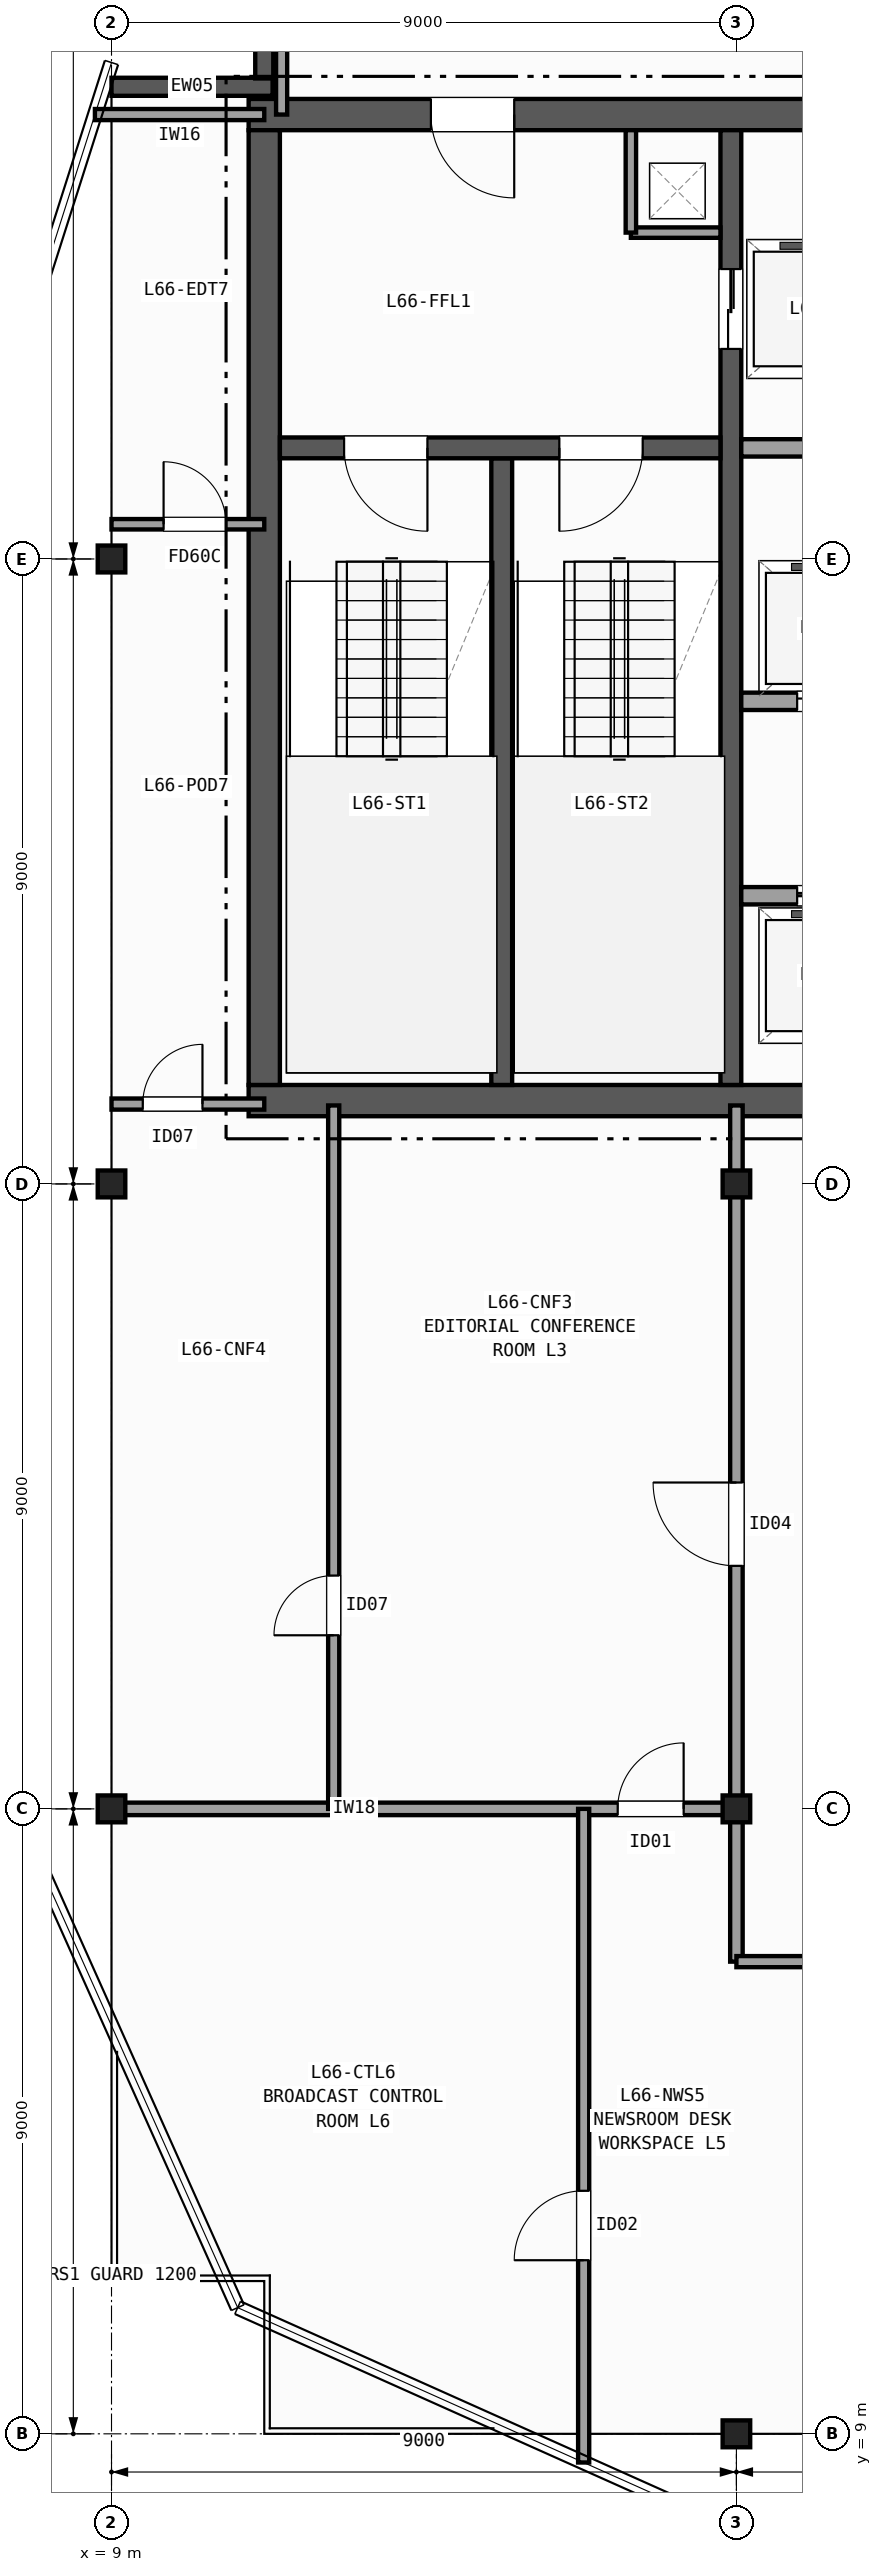
"""IFC4 building model, lengths in metres.
Left out: names, types, materials, properties, quantities, classifications, styles, units other than length and angle.
Written with IfcOpenShell. Run it as: python <this file> out.ifc"""

import sys

from ifc_helpers import new_model, si_unit, direction, frame, frame_2d, origin, origin_2d, place, context, subcontext, project, spatial, rectangle, i_section, extrude, element, fill, save


model = new_model("IFC4")
c1 = context("Model", 3, precision=1e-05, world=origin(), true_north=direction((0.0, 1.0)))
c2 = subcontext(c1, "Body", "Model", "MODEL_VIEW")
j1 = project(units=[si_unit("LENGTHUNIT", "METRE"), si_unit("PLANEANGLEUNIT", "RADIAN")], contexts=[c1])
p1 = place(None, origin())
s1 = spatial("IfcSite", under=j1, at=p1, CompositionType="ELEMENT")
p2 = place(p1, origin())
s2 = spatial("IfcBuilding", under=s1, at=p2, CompositionType="ELEMENT")
p3 = place(p2, frame((0.0, 0.0, 263.0)))
s3 = spatial("IfcBuildingStorey", under=s2, at=p3, CompositionType="ELEMENT", Elevation=263.0)
for number, where, z_axis, x_axis in (
    (1, (9.0, 18.0, 0.0), (0.0, 0.0, 1.0), (1.0, 0.0, 0.0)),
    (2, (9.0, 27.0, 0.0), (0.0, 0.0, 1.0), (1.0, 0.0, 0.0)),
    (3, (9.0, 36.0, 0.0), (0.0, 0.0, 1.0), (1.0, 0.0, 0.0)),
    (4, (18.0, 9.0, 0.0), (0.0, 0.0, 1.0), (1.0, 0.0, 0.0)),
    (5, (18.0, 18.0, 0.0), (0.0, 0.0, 1.0), (1.0, 0.0, 0.0)),
    (6, (18.0, 27.0, 0.0), (0.0, 0.0, 1.0), (1.0, 0.0, 0.0)),
):
    element("IfcColumn", number, at=place(p3, frame(where, z_axis=z_axis, x_axis=x_axis)), inside=s3, PredefinedType="COLUMN", context=c2, shape_type="SweptSolid", body=[
        extrude(i_section(OverallWidth=0.397, OverallDepth=0.387, WebThickness=0.021, FlangeThickness=0.033, FilletRadius=0.015, at=origin_2d()), origin(), (0.0, 0.0, 1.0), 3.7),
    ])
p4 = place(p3, frame((9.0, 42.8, 0.0), z_axis=(0.0, 0.0, 1.0), x_axis=(1.0, 0.0, 0.0)))
e7 = element("IfcWall", 7, at=p4, inside=s3, PredefinedType="SOLIDWALL", context=c2, shape_type="SweptSolid", body=[
    extrude(rectangle(XDim=2.32, YDim=0.26, at=frame_2d((1.16, 0.0))), origin(), (0.0, 0.0, 1.0), 3.42),
])
p5 = place(p3, frame((11.2, 42.92, 0.0), z_axis=(0.0, 0.0, 1.0), x_axis=(0.0, 1.0, 0.0)))
e8 = element("IfcWall", 8, at=p5, inside=s3, PredefinedType="SOLIDWALL", context=c2, shape_type="SweptSolid", body=[
    extrude(rectangle(XDim=2.08, YDim=0.26, at=frame_2d((1.04, 0.0))), origin(), (0.0, 0.0, 1.0), 3.42),
])
p6 = place(p3, frame((10.975, 28.2, 0.0), z_axis=(0.0, 0.0, 1.0), x_axis=(1.0, 0.0, 0.0)))
e9 = element("IfcWall", 9, at=p6, inside=s3, PredefinedType="SHEAR", context=c2, shape_type="SweptSolid", body=[
    extrude(rectangle(XDim=13.85, YDim=0.45, at=frame_2d((6.925, 0.0))), origin(), (0.0, 0.0, 1.0), 3.42),
])
p7 = place(p3, frame((24.825, 42.4, 0.0), z_axis=(0.0, 0.0, 1.0), x_axis=(-1.0, 0.0, 0.0)))
e10 = element("IfcWall", 10, at=p7, inside=s3, PredefinedType="SHEAR", context=c2, shape_type="SweptSolid", body=[
    extrude(rectangle(XDim=13.85, YDim=0.45, at=frame_2d((6.925, 0.0))), origin(), (0.0, 0.0, 1.0), 3.42),
])
p8 = place(p7, frame((10.025, 0.0, 0.0)))
e11 = element("IfcOpeningElement", 11, at=p8, cuts=e10, PredefinedType="OPENING", context=c2, shape_type="SweptSolid", body=[
    extrude(rectangle(XDim=1.2, YDim=2.15, at=frame_2d((0.6, 1.075))), frame((0.0, 0.235, 0.0), z_axis=(0.0, -1.0, 0.0), x_axis=(1.0, 0.0, 0.0)), (0.0, 0.0, 1.0), 0.47),
])
p9 = place(p7, frame((2.975, 0.0, 0.0)))
e12 = element("IfcOpeningElement", 12, at=p9, cuts=e10, PredefinedType="OPENING", context=c2, shape_type="SweptSolid", body=[
    extrude(rectangle(XDim=0.9, YDim=2.1, at=frame_2d((0.45, 1.05))), frame((0.0, 0.235, 0.0), z_axis=(0.0, -1.0, 0.0), x_axis=(1.0, 0.0, 0.0)), (0.0, 0.0, 1.0), 0.47),
])
p10 = place(p3, frame((11.2, 42.175, 0.0), z_axis=(0.0, 0.0, 1.0), x_axis=(0.0, -1.0, 0.0)))
e13 = element("IfcWall", 13, at=p10, inside=s3, PredefinedType="SHEAR", context=c2, shape_type="SweptSolid", body=[
    extrude(rectangle(XDim=13.75, YDim=0.45, at=frame_2d((6.875, 0.0))), origin(), (0.0, 0.0, 1.0), 3.42),
])
p11 = place(p3, frame((14.62, 28.425, 0.0), z_axis=(0.0, 0.0, 1.0), x_axis=(0.0, 1.0, 0.0)))
e14 = element("IfcWall", 14, at=p11, inside=s3, PredefinedType="SHEAR", context=c2, shape_type="SweptSolid", body=[
    extrude(rectangle(XDim=9.025, YDim=0.3, at=frame_2d((4.512, 0.0))), origin(), (0.0, 0.0, 1.0), 3.42),
])
p12 = place(p3, frame((17.92, 42.175, 0.0), z_axis=(0.0, 0.0, 1.0), x_axis=(0.0, -1.0, 0.0)))
e15 = element("IfcWall", 15, at=p12, inside=s3, PredefinedType="SHEAR", context=c2, shape_type="SweptSolid", body=[
    extrude(rectangle(XDim=13.75, YDim=0.3, at=frame_2d((6.875, 0.0))), origin(), (0.0, 0.0, 1.0), 3.42),
])
p13 = place(p12, frame((2.0, 0.0, 0.0)))
e16 = element("IfcOpeningElement", 16, at=p13, cuts=e15, PredefinedType="OPENING", context=c2, shape_type="SweptSolid", body=[
    extrude(rectangle(XDim=1.15, YDim=2.15, at=frame_2d((0.575, 1.075))), frame((0.0, 0.16, 0.0), z_axis=(0.0, -1.0, 0.0), x_axis=(1.0, 0.0, 0.0)), (0.0, 0.0, 1.0), 0.32),
])
p14 = place(p3, frame((17.77, 37.6, 0.0), z_axis=(0.0, 0.0, 1.0), x_axis=(-1.0, 0.0, 0.0)))
e17 = element("IfcWall", 17, at=p14, inside=s3, PredefinedType="SHEAR", context=c2, shape_type="SweptSolid", body=[
    extrude(rectangle(XDim=6.345, YDim=0.3, at=frame_2d((3.172, 0.0))), origin(), (0.0, 0.0, 1.0), 3.42),
])
p15 = place(p14, frame((4.22, 0.0, 0.0)))
e18 = element("IfcOpeningElement", 18, at=p15, cuts=e17, PredefinedType="OPENING", context=c2, shape_type="SweptSolid", body=[
    extrude(rectangle(XDim=1.2, YDim=2.15, at=frame_2d((0.6, 1.075))), frame((0.0, 0.16, 0.0), z_axis=(0.0, -1.0, 0.0), x_axis=(1.0, 0.0, 0.0)), (0.0, 0.0, 1.0), 0.32),
])
p16 = place(p14, frame((1.12, 0.0, 0.0)))
e19 = element("IfcOpeningElement", 19, at=p16, cuts=e17, PredefinedType="OPENING", context=c2, shape_type="SweptSolid", body=[
    extrude(rectangle(XDim=1.2, YDim=2.15, at=frame_2d((0.6, 1.075))), frame((0.0, 0.16, 0.0), z_axis=(0.0, -1.0, 0.0), x_axis=(1.0, 0.0, 0.0)), (0.0, 0.0, 1.0), 0.32),
])
p17 = place(p3, frame((16.48, 40.7, 0.0), z_axis=(0.0, 0.0, 1.0), x_axis=(1.0, 0.0, 0.0)))
e20 = element("IfcWall", 20, at=p17, inside=s3, PredefinedType="PARTITIONING", context=c2, shape_type="SweptSolid", body=[
    extrude(rectangle(XDim=1.29, YDim=0.15, at=frame_2d((0.645, 0.0))), origin(), (0.0, 0.0, 1.0), 3.42),
])
p18 = place(p3, frame((16.48, 40.7, 0.0), z_axis=(0.0, 0.0, 1.0), x_axis=(0.0, 1.0, 0.0)))
e21 = element("IfcWall", 21, at=p18, inside=s3, PredefinedType="PARTITIONING", context=c2, shape_type="SweptSolid", body=[
    extrude(rectangle(XDim=1.475, YDim=0.15, at=frame_2d((0.738, 0.0))), origin(), (0.0, 0.0, 1.0), 3.42),
])
p19 = place(p3, frame((18.07, 37.6, 0.0), z_axis=(0.0, 0.0, 1.0), x_axis=(1.0, 0.0, 0.0)))
e22 = element("IfcWall", 22, at=p19, inside=s3, PredefinedType="PARTITIONING", context=c2, shape_type="SweptSolid", body=[
    extrude(rectangle(XDim=6.305, YDim=0.25, at=frame_2d((3.152, 0.0))), origin(), (0.0, 0.0, 1.0), 3.42),
])
p20 = place(p3, frame((18.07, 31.15, 0.0), z_axis=(0.0, 0.0, 1.0), x_axis=(1.0, 0.0, 0.0)))
e23 = element("IfcWall", 23, at=p20, inside=s3, PredefinedType="PARTITIONING", context=c2, shape_type="SweptSolid", body=[
    extrude(rectangle(XDim=6.305, YDim=0.25, at=frame_2d((3.152, 0.0))), origin(), (0.0, 0.0, 1.0), 3.42),
])
p21 = place(p20, frame((0.805, 0.0, 0.0)))
e24 = element("IfcOpeningElement", 24, at=p21, cuts=e23, PredefinedType="OPENING", context=c2, shape_type="SweptSolid", body=[
    extrude(rectangle(XDim=1.15, YDim=2.15, at=frame_2d((0.575, 1.075))), frame((0.0, 0.135, 0.0), z_axis=(0.0, -1.0, 0.0), x_axis=(1.0, 0.0, 0.0)), (0.0, 0.0, 1.0), 0.27),
])
p22 = place(p20, frame((3.355, 0.0, 0.0)))
e25 = element("IfcOpeningElement", 25, at=p22, cuts=e23, PredefinedType="OPENING", context=c2, shape_type="SweptSolid", body=[
    extrude(rectangle(XDim=1.15, YDim=2.15, at=frame_2d((0.575, 1.075))), frame((0.0, 0.135, 0.0), z_axis=(0.0, -1.0, 0.0), x_axis=(1.0, 0.0, 0.0)), (0.0, 0.0, 1.0), 0.27),
])
p23 = place(p3, frame((24.375, 33.95, 0.0), z_axis=(0.0, 0.0, 1.0), x_axis=(-1.0, 0.0, 0.0)))
e26 = element("IfcWall", 26, at=p23, inside=s3, PredefinedType="PARTITIONING", context=c2, shape_type="SweptSolid", body=[
    extrude(rectangle(XDim=6.305, YDim=0.25, at=frame_2d((3.152, 0.0))), origin(), (0.0, 0.0, 1.0), 3.42),
])
p24 = place(p23, frame((4.35, 0.0, 0.0)))
e27 = element("IfcOpeningElement", 27, at=p24, cuts=e26, PredefinedType="OPENING", context=c2, shape_type="SweptSolid", body=[
    extrude(rectangle(XDim=1.15, YDim=2.15, at=frame_2d((0.575, 1.075))), frame((0.0, 0.135, 0.0), z_axis=(0.0, -1.0, 0.0), x_axis=(1.0, 0.0, 0.0)), (0.0, 0.0, 1.0), 0.27),
])
p25 = place(p23, frame((1.8, 0.0, 0.0)))
e28 = element("IfcOpeningElement", 28, at=p25, cuts=e26, PredefinedType="OPENING", context=c2, shape_type="SweptSolid", body=[
    extrude(rectangle(XDim=1.15, YDim=2.15, at=frame_2d((0.575, 1.075))), frame((0.0, 0.135, 0.0), z_axis=(0.0, -1.0, 0.0), x_axis=(1.0, 0.0, 0.0)), (0.0, 0.0, 1.0), 0.27),
])
p26 = place(p3, frame((9.0, 28.15, 0.0), z_axis=(0.0, 0.0, 1.0), x_axis=(1.0, 0.0, 0.0)))
e29 = element("IfcWall", 29, at=p26, inside=s3, PredefinedType="PARTITIONING", context=c2, shape_type="SweptSolid", body=[
    extrude(rectangle(XDim=2.2, YDim=0.16, at=frame_2d((1.1, 0.0))), origin(), (0.0, 0.0, 1.0), 2.707),
])
p27 = place(p26, frame((0.45, 0.0, 0.0)))
e30 = element("IfcOpeningElement", 30, at=p27, cuts=e29, PredefinedType="OPENING", context=c2, shape_type="SweptSolid", body=[
    extrude(rectangle(XDim=0.86, YDim=2.05, at=frame_2d((0.43, 1.025))), frame((0.0, 0.09, 0.0), z_axis=(0.0, -1.0, 0.0), x_axis=(1.0, 0.0, 0.0)), (0.0, 0.0, 1.0), 0.18),
])
p28 = place(p3, frame((8.761, 42.4, 0.0), z_axis=(0.0, 0.0, 1.0), x_axis=(1.0, 0.0, 0.0)))
e31 = element("IfcWall", 31, at=p28, inside=s3, PredefinedType="PARTITIONING", context=c2, shape_type="SweptSolid", body=[
    extrude(rectangle(XDim=2.439, YDim=0.16, at=frame_2d((1.219, 0.0))), origin(), (0.0, 0.0, 1.0), 3.42),
])
p29 = place(p3, frame((11.45, 42.4, 0.0), z_axis=(0.0, 0.0, 1.0), x_axis=(0.0, 1.0, 0.0)))
e32 = element("IfcWall", 32, at=p29, inside=s3, PredefinedType="PARTITIONING", context=c2, shape_type="SweptSolid", body=[
    extrude(rectangle(XDim=2.666, YDim=0.16, at=frame_2d((1.333, 0.0))), origin(), (0.0, 0.0, 1.0), 3.42),
])
p30 = place(p3, frame((9.0, 36.5, 0.0), z_axis=(0.0, 0.0, 1.0), x_axis=(1.0, 0.0, 0.0)))
e33 = element("IfcWall", 33, at=p30, inside=s3, PredefinedType="PARTITIONING", context=c2, shape_type="SweptSolid", body=[
    extrude(rectangle(XDim=2.2, YDim=0.15, at=frame_2d((1.1, 0.0))), origin(), (0.0, 0.0, 1.0), 3.42),
])
p31 = place(p30, frame((0.75, 0.0, 0.0)))
e34 = element("IfcOpeningElement", 34, at=p31, cuts=e33, PredefinedType="OPENING", context=c2, shape_type="SweptSolid", body=[
    extrude(rectangle(XDim=0.9, YDim=2.1, at=frame_2d((0.45, 1.05))), frame((0.0, 0.085, 0.0), z_axis=(0.0, -1.0, 0.0), x_axis=(1.0, 0.0, 0.0)), (0.0, 0.0, 1.0), 0.17),
])
p32 = place(p3, frame((9.0, 18.0, 0.0), z_axis=(0.0, 0.0, 1.0), x_axis=(1.0, 0.0, 0.0)))
e35 = element("IfcWall", 35, at=p32, inside=s3, PredefinedType="PARTITIONING", context=c2, shape_type="SweptSolid", body=[
    extrude(rectangle(XDim=9.08, YDim=0.18, at=frame_2d((4.54, 0.0))), origin(), (0.0, 0.0, 1.0), 2.707),
])
p33 = place(p32, frame((7.29, 0.0, 0.0)))
e36 = element("IfcOpeningElement", 36, at=p33, cuts=e35, PredefinedType="OPENING", context=c2, shape_type="SweptSolid", body=[
    extrude(rectangle(XDim=0.95, YDim=2.1, at=frame_2d((0.475, 1.05))), frame((0.0, 0.1, 0.0), z_axis=(0.0, -1.0, 0.0), x_axis=(1.0, 0.0, 0.0)), (0.0, 0.0, 1.0), 0.2),
])
p34 = place(p3, frame((18.0, 15.8, 0.0), z_axis=(0.0, 0.0, 1.0), x_axis=(0.0, 1.0, 0.0)))
e37 = element("IfcWall", 37, at=p34, inside=s3, PredefinedType="PARTITIONING", context=c2, shape_type="SweptSolid", body=[
    extrude(rectangle(XDim=12.33, YDim=0.18, at=frame_2d((6.165, 0.0))), origin(), (0.0, 0.0, 1.0), 2.789),
])
p35 = place(p34, frame((5.7, 0.0, 0.0)))
e38 = element("IfcOpeningElement", 38, at=p35, cuts=e37, PredefinedType="OPENING", context=c2, shape_type="SweptSolid", body=[
    extrude(rectangle(XDim=1.2, YDim=2.15, at=frame_2d((0.6, 1.075))), frame((0.0, 0.1, 0.0), z_axis=(0.0, -1.0, 0.0), x_axis=(1.0, 0.0, 0.0)), (0.0, 0.0, 1.0), 0.2),
])
p36 = place(p3, frame((18.0, 15.8, 0.0), z_axis=(0.0, 0.0, 1.0), x_axis=(1.0, 0.0, 0.0)))
e39 = element("IfcWall", 39, at=p36, inside=s3, PredefinedType="PARTITIONING", context=c2, shape_type="SweptSolid", body=[
    extrude(rectangle(XDim=6.65, YDim=0.16, at=frame_2d((3.325, 0.0))), origin(), (0.0, 0.0, 1.0), 2.789),
])
p37 = place(p3, frame((12.2, 18.0, 0.0), z_axis=(0.0, 0.0, 1.0), x_axis=(0.0, 1.0, 0.0)))
e40 = element("IfcWall", 40, at=p37, inside=s3, PredefinedType="PARTITIONING", context=c2, shape_type="SweptSolid", body=[
    extrude(rectangle(XDim=10.13, YDim=0.16, at=frame_2d((5.065, 0.0))), origin(), (0.0, 0.0, 1.0), 2.789),
])
p38 = place(p37, frame((2.5, 0.0, 0.0)))
e41 = element("IfcOpeningElement", 41, at=p38, cuts=e40, PredefinedType="OPENING", context=c2, shape_type="SweptSolid", body=[
    extrude(rectangle(XDim=0.86, YDim=2.05, at=frame_2d((0.43, 1.025))), frame((0.0, 0.09, 0.0), z_axis=(0.0, -1.0, 0.0), x_axis=(1.0, 0.0, 0.0)), (0.0, 0.0, 1.0), 0.18),
])
p39 = place(p3, frame((15.8, 8.587, 0.0), z_axis=(0.0, 0.0, 1.0), x_axis=(0.0, 1.0, 0.0)))
e42 = element("IfcWall", 42, at=p39, inside=s3, PredefinedType="PARTITIONING", context=c2, shape_type="SweptSolid", body=[
    extrude(rectangle(XDim=9.413, YDim=0.16, at=frame_2d((4.707, 0.0))), origin(), (0.0, 0.0, 1.0), 2.789),
])
p40 = place(p39, frame((2.913, 0.0, 0.0)))
e43 = element("IfcOpeningElement", 43, at=p40, cuts=e42, PredefinedType="OPENING", context=c2, shape_type="SweptSolid", body=[
    extrude(rectangle(XDim=1.0, YDim=2.1, at=frame_2d((0.5, 1.05))), frame((0.0, 0.09, 0.0), z_axis=(0.0, -1.0, 0.0), x_axis=(1.0, 0.0, 0.0)), (0.0, 0.0, 1.0), 0.18),
])
p41 = place(p15, origin())
e44 = element("IfcDoor", 44, at=p41, inside=s3, OperationType="SINGLE_SWING_LEFT", PredefinedType="DOOR", context=c2, shape_type="SweptSolid", body=[
    extrude(rectangle(XDim=1.2, YDim=2.15, at=frame_2d((0.6, 1.075))), frame((0.0, 0.025, 0.0), z_axis=(0.0, -1.0, 0.0), x_axis=(1.0, 0.0, 0.0)), (0.0, 0.0, 1.0), 0.05),
])
fill(e18, e44)
p42 = place(p16, origin())
e45 = element("IfcDoor", 45, at=p42, inside=s3, OperationType="SINGLE_SWING_RIGHT", PredefinedType="DOOR", context=c2, shape_type="SweptSolid", body=[
    extrude(rectangle(XDim=1.2, YDim=2.15, at=frame_2d((0.6, 1.075))), frame((0.0, 0.025, 0.0), z_axis=(0.0, -1.0, 0.0), x_axis=(1.0, 0.0, 0.0)), (0.0, 0.0, 1.0), 0.05),
])
fill(e19, e45)
p43 = place(p8, origin())
e46 = element("IfcDoor", 46, at=p43, inside=s3, OperationType="SINGLE_SWING_LEFT", PredefinedType="DOOR", context=c2, shape_type="SweptSolid", body=[
    extrude(rectangle(XDim=1.2, YDim=2.15, at=frame_2d((0.6, 1.075))), frame((0.0, 0.025, 0.0), z_axis=(0.0, -1.0, 0.0), x_axis=(1.0, 0.0, 0.0)), (0.0, 0.0, 1.0), 0.05),
])
fill(e11, e46)
p44 = place(p13, origin())
e47 = element("IfcDoor", 47, at=p44, inside=s3, OperationType="DOUBLE_DOOR_SLIDING", PredefinedType="DOOR", context=c2, shape_type="SweptSolid", body=[
    extrude(rectangle(XDim=1.15, YDim=2.15, at=frame_2d((0.575, 1.075))), frame((0.0, 0.025, 0.0), z_axis=(0.0, -1.0, 0.0), x_axis=(1.0, 0.0, 0.0)), (0.0, 0.0, 1.0), 0.05),
])
fill(e16, e47)
p45 = place(p21, origin())
e48 = element("IfcDoor", 48, at=p45, inside=s3, OperationType="DOUBLE_DOOR_SLIDING", PredefinedType="DOOR", context=c2, shape_type="SweptSolid", body=[
    extrude(rectangle(XDim=1.15, YDim=2.15, at=frame_2d((0.575, 1.075))), frame((0.0, 0.025, 0.0), z_axis=(0.0, -1.0, 0.0), x_axis=(1.0, 0.0, 0.0)), (0.0, 0.0, 1.0), 0.05),
])
fill(e24, e48)
p46 = place(p24, origin())
e49 = element("IfcDoor", 49, at=p46, inside=s3, OperationType="DOUBLE_DOOR_SLIDING", PredefinedType="DOOR", context=c2, shape_type="SweptSolid", body=[
    extrude(rectangle(XDim=1.15, YDim=2.15, at=frame_2d((0.575, 1.075))), frame((0.0, 0.025, 0.0), z_axis=(0.0, -1.0, 0.0), x_axis=(1.0, 0.0, 0.0)), (0.0, 0.0, 1.0), 0.05),
])
fill(e27, e49)
p47 = place(p27, origin())
e50 = element("IfcDoor", 50, at=p47, inside=s3, OperationType="SINGLE_SWING_RIGHT", PredefinedType="DOOR", context=c2, shape_type="SweptSolid", body=[
    extrude(rectangle(XDim=0.86, YDim=2.05, at=frame_2d((0.43, 1.025))), frame((0.0, 0.025, 0.0), z_axis=(0.0, -1.0, 0.0), x_axis=(1.0, 0.0, 0.0)), (0.0, 0.0, 1.0), 0.05),
])
fill(e30, e50)
p48 = place(p31, origin())
e51 = element("IfcDoor", 51, at=p48, inside=s3, OperationType="SINGLE_SWING_LEFT", PredefinedType="DOOR", context=c2, shape_type="SweptSolid", body=[
    extrude(rectangle(XDim=0.9, YDim=2.1, at=frame_2d((0.45, 1.05))), frame((0.0, 0.025, 0.0), z_axis=(0.0, -1.0, 0.0), x_axis=(1.0, 0.0, 0.0)), (0.0, 0.0, 1.0), 0.05),
])
fill(e34, e51)
p49 = place(p35, origin())
e52 = element("IfcDoor", 52, at=p49, inside=s3, OperationType="SINGLE_SWING_RIGHT", PredefinedType="DOOR", context=c2, shape_type="SweptSolid", body=[
    extrude(rectangle(XDim=1.2, YDim=2.15, at=frame_2d((0.6, 1.075))), frame((0.0, 0.025, 0.0), z_axis=(0.0, -1.0, 0.0), x_axis=(1.0, 0.0, 0.0)), (0.0, 0.0, 1.0), 0.05),
])
fill(e38, e52)
p50 = place(p38, origin())
e53 = element("IfcDoor", 53, at=p50, inside=s3, OperationType="SINGLE_SWING_LEFT", PredefinedType="DOOR", context=c2, shape_type="SweptSolid", body=[
    extrude(rectangle(XDim=0.86, YDim=2.05, at=frame_2d((0.43, 1.025))), frame((0.0, 0.025, 0.0), z_axis=(0.0, -1.0, 0.0), x_axis=(1.0, 0.0, 0.0)), (0.0, 0.0, 1.0), 0.05),
])
fill(e41, e53)
p51 = place(p33, origin())
e54 = element("IfcDoor", 54, at=p51, inside=s3, OperationType="SINGLE_SWING_RIGHT", PredefinedType="DOOR", context=c2, shape_type="SweptSolid", body=[
    extrude(rectangle(XDim=0.95, YDim=2.1, at=frame_2d((0.475, 1.05))), frame((0.0, 0.025, 0.0), z_axis=(0.0, -1.0, 0.0), x_axis=(1.0, 0.0, 0.0)), (0.0, 0.0, 1.0), 0.05),
])
fill(e36, e54)
p52 = place(p40, origin())
e55 = element("IfcDoor", 55, at=p52, inside=s3, OperationType="SINGLE_SWING_LEFT", PredefinedType="DOOR", context=c2, shape_type="SweptSolid", body=[
    extrude(rectangle(XDim=1.0, YDim=2.1, at=frame_2d((0.5, 1.05))), frame((0.0, 0.025, 0.0), z_axis=(0.0, -1.0, 0.0), x_axis=(1.0, 0.0, 0.0)), (0.0, 0.0, 1.0), 0.05),
])
fill(e43, e55)
save(model, sys.argv[1])
